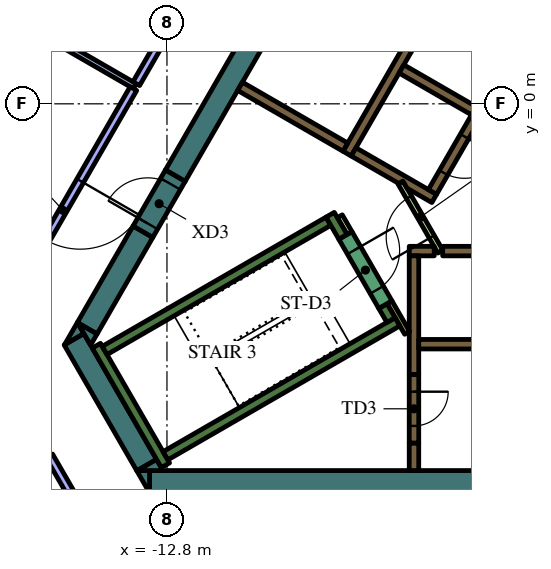
"""IFC4 building model, lengths in metres.
Left out: names, types, materials, properties, quantities, classifications, styles, units other than length and angle.
Written with IfcOpenShell. Run it as: python <this file> out.ifc"""

import sys

from ifc_helpers import new_model, si_unit, direction, frame, frame_2d, origin, place, context, subcontext, project, spatial, polyline, rectangle, outline, extrude, element, fill, save


model = new_model("IFC4")
c1 = context("Model", 3, precision=1e-05, world=origin(), true_north=direction((0.0, 1.0)))
c2 = subcontext(c1, "Body", "Model", "MODEL_VIEW")
j1 = project(units=[si_unit("LENGTHUNIT", "METRE"), si_unit("PLANEANGLEUNIT", "RADIAN")], contexts=[c1])
p1 = place(None, origin())
s1 = spatial("IfcSite", under=j1, at=p1, CompositionType="ELEMENT")
p2 = place(p1, origin())
s2 = spatial("IfcBuilding", under=s1, at=p2, CompositionType="ELEMENT")
p3 = place(p2, frame((0.0, 0.0, 317.4)))
s3 = spatial("IfcBuildingStorey", under=s2, at=p3, CompositionType="ELEMENT", Elevation=317.4)
p4 = place(p3, frame((8.904, -9.95, 0.0), z_axis=(0.0, 0.0, 1.0), x_axis=(-1.0, 0.0, 0.0)))
e1 = element("IfcWall", 1, at=p4, inside=s3, PredefinedType="SOLIDWALL", context=c2, shape_type="SweptSolid", body=[
    extrude(rectangle(XDim=22.161, YDim=0.6, at=frame_2d((11.081, 0.0))), origin(), (0.0, 0.0, 1.0), 4.2),
])
p5 = place(p3, origin())
e2 = element("IfcWall", 2, at=p5, inside=s3, PredefinedType="SOLIDWALL", context=c2, shape_type="SweptSolid", body=[
    extrude(outline(polyline([(-13.597, -9.65), (-13.259, -9.65), (-13.259, -10.236), (-13.597, -9.65)])), origin(), (0.0, 0.0, 1.0), 4.2),
])
p6 = place(p3, frame((-13.333, -9.506, 0.0), z_axis=(0.0, 0.0, 1.0), x_axis=(-0.500019073792, 0.866014391245, 0.0)))
e3 = element("IfcWall", 3, at=p6, inside=s3, PredefinedType="SOLIDWALL", context=c2, shape_type="SweptSolid", body=[
    extrude(rectangle(XDim=3.823, YDim=0.6, at=frame_2d((1.912, 0.0))), origin(), (0.0, 0.0, 1.0), 4.2),
])
e4 = element("IfcWall", 4, at=p5, inside=s3, PredefinedType="SOLIDWALL", context=c2, shape_type="SweptSolid", body=[
    extrude(outline(polyline([(-14.987, -6.043), (-15.493, -6.335), (-15.156, -5.75), (-14.987, -6.043)])), origin(), (0.0, 0.0, 1.0), 4.2),
])
e5 = element("IfcWall", 5, at=p5, inside=s3, PredefinedType="SOLIDWALL", context=c2, shape_type="SweptSolid", body=[
    extrude(outline(polyline([(-12.904, -9.65), (-13.58, -9.65), (-13.073, -9.357), (-12.904, -9.65)])), origin(), (0.0, 0.0, 1.0), 4.2),
])
p7 = place(p3, frame((-13.432, -3.364, 0.0), z_axis=(0.0, 0.0, 1.0), x_axis=(-0.499960127962, -0.866048422692, 0.0)))
e6 = element("IfcWall", 6, at=p7, inside=s3, PredefinedType="SOLIDWALL", context=c2, shape_type="SweptSolid", body=[
    extrude(rectangle(XDim=2.934, YDim=0.6, at=frame_2d((1.467, 0.0))), origin(), (0.0, 0.0, 1.0), 4.2),
])
e7 = element("IfcWall", 7, at=p5, inside=s3, PredefinedType="SOLIDWALL", context=c2, shape_type="SweptSolid", body=[
    extrude(outline(polyline([(-14.809, -6.35), (-15.147, -5.764), (-14.64, -6.057), (-14.809, -6.35)])), origin(), (0.0, 0.0, 1.0), 4.2),
])
p8 = place(p3, frame((-12.582, -1.892, 0.0), z_axis=(0.0, 0.0, 1.0), x_axis=(0.500003640647, 0.866023301845, 0.0)))
e8 = element("IfcWall", 8, at=p8, inside=s3, PredefinedType="SOLIDWALL", context=c2, shape_type="SweptSolid", body=[
    extrude(rectangle(XDim=15.858, YDim=0.6, at=frame_2d((7.929, 0.0))), origin(), (0.0, 0.0, 1.0), 4.2),
])
p9 = place(p3, frame((-12.84, -9.511, 0.0), z_axis=(0.0, 0.0, 1.0), x_axis=(-0.499997733992, 0.866026712061, 0.0)))
e9 = element("IfcWall", 9, at=p9, inside=s3, PredefinedType="SOLIDWALL", context=c2, shape_type="SweptSolid", body=[
    extrude(rectangle(XDim=3.634, YDim=0.25, at=frame_2d((1.817, 0.0))), origin(), (0.0, 0.0, 1.0), 4.2),
])
p10 = place(p3, frame((-14.44, -6.49, 0.0), z_axis=(0.0, 0.0, 1.0), x_axis=(0.866022966069, 0.500004222222, 0.0)))
e10 = element("IfcWall", 10, at=p10, inside=s3, PredefinedType="SOLIDWALL", context=c2, shape_type="SweptSolid", body=[
    extrude(rectangle(XDim=6.8, YDim=0.25, at=frame_2d((3.4, 0.0))), origin(), (0.0, 0.0, 1.0), 4.2),
])
p11 = place(p3, frame((-8.168, -3.503, 0.0), z_axis=(0.0, 0.0, 1.0), x_axis=(-0.499952099219, 0.866053057547, 0.0)))
e11 = element("IfcWall", 11, at=p11, inside=s3, PredefinedType="SOLIDWALL", context=c2, shape_type="SweptSolid", body=[
    extrude(rectangle(XDim=0.675, YDim=0.25, at=frame_2d((0.337, 0.0))), origin(), (0.0, 0.0, 1.0), 4.2),
])
p12 = place(p3, frame((-12.84, -9.261, 0.0), z_axis=(0.0, 0.0, 1.0), x_axis=(0.866016039709, 0.500016218704, 0.0)))
e12 = element("IfcWall", 12, at=p12, inside=s3, PredefinedType="SOLIDWALL", context=c2, shape_type="SweptSolid", body=[
    extrude(rectangle(XDim=7.05, YDim=0.25, at=frame_2d((3.525, 0.0))), origin(), (0.0, 0.0, 1.0), 4.2),
])
p13 = place(p3, frame((-6.905, -5.69, 0.0), z_axis=(0.0, 0.0, 1.0), x_axis=(-0.500402024738, 0.865793170242, 0.0)))
e13 = element("IfcWall", 13, at=p13, inside=s3, PredefinedType="SOLIDWALL", context=c2, shape_type="SweptSolid", body=[
    extrude(rectangle(XDim=0.425, YDim=0.25, at=frame_2d((0.212, 0.0))), origin(), (0.0, 0.0, 1.0), 4.2),
])
p14 = place(p3, frame((-5.545, -3.875, 0.0), z_axis=(0.0, 0.0, 1.0), x_axis=(1.0, 0.0, 0.0)))
e14 = element("IfcWall", 14, at=p14, inside=s3, PredefinedType="SOLIDWALL", context=c2, shape_type="SweptSolid", body=[
    extrude(rectangle(XDim=11.97, YDim=0.25, at=frame_2d((5.985, 0.0))), origin(), (0.0, 0.0, 1.0), 4.2),
])
p15 = place(p3, frame((-6.425, -3.875, 0.0), z_axis=(0.0, 0.0, 1.0), x_axis=(1.0, 0.0, 0.0)))
e15 = element("IfcWall", 15, at=p15, inside=s3, PredefinedType="SOLIDWALL", context=c2, shape_type="SweptSolid", body=[
    extrude(rectangle(XDim=0.658, YDim=0.25, at=frame_2d((0.329, 0.0))), origin(), (0.0, 0.0, 1.0), 4.2),
])
p16 = place(p3, frame((-6.3, -7.125, 0.0), z_axis=(0.0, 0.0, 1.0), x_axis=(0.0, 1.0, 0.0)))
e16 = element("IfcWall", 16, at=p16, inside=s3, PredefinedType="SOLIDWALL", context=c2, shape_type="SweptSolid", body=[
    extrude(rectangle(XDim=3.125, YDim=0.25, at=frame_2d((1.562, 0.0))), origin(), (0.0, 0.0, 1.0), 4.2),
])
p17 = place(p3, frame((-6.3, -8.925, 0.0), z_axis=(0.0, 0.0, 1.0), x_axis=(0.0, -1.0, 0.0)))
e17 = element("IfcWall", 17, at=p17, inside=s3, PredefinedType="SOLIDWALL", context=c2, shape_type="SweptSolid", body=[
    extrude(rectangle(XDim=0.725, YDim=0.25, at=frame_2d((0.363, 0.0))), origin(), (0.0, 0.0, 1.0), 4.2),
])
p18 = place(p3, frame((-8.06, -1.311, 0.0), z_axis=(0.0, 0.0, 1.0), x_axis=(0.50000273126, 0.866023826885, 0.0)))
e18 = element("IfcWall", 18, at=p18, inside=s3, PredefinedType="SOLIDWALL", context=c2, shape_type="SweptSolid", body=[
    extrude(rectangle(XDim=10.33, YDim=0.25, at=frame_2d((5.165, 0.0))), origin(), (0.0, 0.0, 1.0), 4.2),
])
p19 = place(p3, frame((-4.724, -0.182, 0.0), z_axis=(0.0, 0.0, 1.0), x_axis=(-0.866008176907, 0.50002983664, 0.0)))
e19 = element("IfcWall", 19, at=p19, inside=s3, PredefinedType="SOLIDWALL", context=c2, shape_type="SweptSolid", body=[
    extrude(rectangle(XDim=2.2, YDim=0.25, at=frame_2d((1.1, 0.0))), origin(), (0.0, 0.0, 1.0), 4.2),
])
e20 = element("IfcWall", 20, at=p5, inside=s3, PredefinedType="SOLIDWALL", context=c2, shape_type="SweptSolid", body=[
    extrude(outline(polyline([(-5.922, -2.257), (-5.922, -2.257), (-5.705, -2.382), (-5.83, -2.598), (-6.483, -2.221), (-6.591, -2.033), (-6.591, -2.033), (-6.7, -2.096), (-7.952, -1.373), (-7.827, -1.156), (-5.922, -2.257)])), origin(), (0.0, 0.0, 1.0), 4.2),
])
p20 = place(p3, frame((-8.106, -1.14, 0.0), z_axis=(0.0, 0.0, 1.0), x_axis=(-0.866008981251, 0.500028443584, 0.0)))
e21 = element("IfcWall", 21, at=p20, inside=s3, PredefinedType="SOLIDWALL", context=c2, shape_type="SweptSolid", body=[
    extrude(rectangle(XDim=3.2, YDim=0.25, at=frame_2d((1.6, 0.0))), origin(), (0.0, 0.0, 1.0), 4.2),
])
p21 = place(p3, frame((-8.252, -2.958, 0.0), z_axis=(0.0, 0.0, 1.0), x_axis=(0.500174715838, -0.865924508047, 0.0)))
e22 = element("IfcWall", 22, at=p21, inside=s3, PredefinedType="PARTITIONING", context=c2, shape_type="SweptSolid", body=[
    extrude(rectangle(XDim=0.514, YDim=0.15, at=frame_2d((0.257, 0.0))), origin(), (0.0, 0.0, 1.0), 3.5),
])
p22 = place(p3, frame((-6.48, -6.027, 0.0), z_axis=(0.0, 0.0, 1.0), x_axis=(-0.499927229454, 0.866067413802, 0.0)))
e23 = element("IfcWall", 23, at=p22, inside=s3, PredefinedType="PARTITIONING", context=c2, shape_type="SweptSolid", body=[
    extrude(rectangle(XDim=0.929, YDim=0.15, at=frame_2d((0.464, 0.0))), origin(), (0.0, 0.0, 1.0), 4.2),
])
p23 = place(p3, frame((-6.175, -6.325, 0.0), z_axis=(0.0, 0.0, 1.0), x_axis=(1.0, 0.0, 0.0)))
e24 = element("IfcWall", 24, at=p23, inside=s3, PredefinedType="SOLIDWALL", context=c2, shape_type="SweptSolid", body=[
    extrude(rectangle(XDim=12.35, YDim=0.25, at=frame_2d((6.175, 0.0))), origin(), (0.0, 0.0, 1.0), 4.2),
])
p24 = place(p23, frame((3.205, 0.0, 0.0)))
e25 = element("IfcOpeningElement", 25, at=p24, cuts=e24, PredefinedType="OPENING", context=c2, shape_type="SweptSolid", body=[
    extrude(rectangle(XDim=0.9, YDim=2.1, at=frame_2d((0.45, 1.05))), frame((0.0, 0.135, 0.0), z_axis=(0.0, -1.0, 0.0), x_axis=(1.0, 0.0, 0.0)), (0.0, 0.0, 1.0), 0.27),
])
p25 = place(p23, frame((8.145, 0.0, 0.0)))
e26 = element("IfcOpeningElement", 26, at=p25, cuts=e24, PredefinedType="OPENING", context=c2, shape_type="SweptSolid", body=[
    extrude(rectangle(XDim=1.1, YDim=2.1, at=frame_2d((0.55, 1.05))), frame((0.0, 0.135, 0.0), z_axis=(0.0, -1.0, 0.0), x_axis=(1.0, 0.0, 0.0)), (0.0, 0.0, 1.0), 0.27),
])
p26 = place(p23, frame((10.665, 0.0, 0.0)))
e27 = element("IfcOpeningElement", 27, at=p26, cuts=e24, PredefinedType="OPENING", context=c2, shape_type="SweptSolid", body=[
    extrude(rectangle(XDim=1.1, YDim=2.1, at=frame_2d((0.55, 1.05))), frame((0.0, 0.135, 0.0), z_axis=(0.0, -1.0, 0.0), x_axis=(1.0, 0.0, 0.0)), (0.0, 0.0, 1.0), 0.27),
])
p27 = place(p3, frame((-0.898, 6.194, 0.0), z_axis=(0.0, 0.0, 1.0), x_axis=(-0.499996202215, -0.866027596426, 0.0)))
e28 = element("IfcWall", 28, at=p27, inside=s3, PredefinedType="SOLIDWALL", context=c2, shape_type="SweptSolid", body=[
    extrude(rectangle(XDim=9.83, YDim=0.25, at=frame_2d((4.915, 0.0))), origin(), (0.0, 0.0, 1.0), 4.2),
])
p28 = place(p27, frame((0.585, 0.0, 0.0)))
e29 = element("IfcOpeningElement", 29, at=p28, cuts=e28, PredefinedType="OPENING", context=c2, shape_type="SweptSolid", body=[
    extrude(rectangle(XDim=1.1, YDim=2.1, at=frame_2d((0.55, 1.05))), frame((0.0, 0.135, 0.0), z_axis=(0.0, -1.0, 0.0), x_axis=(1.0, 0.0, 0.0)), (0.0, 0.0, 1.0), 0.27),
])
p29 = place(p27, frame((3.105, 0.0, 0.0)))
e30 = element("IfcOpeningElement", 30, at=p29, cuts=e28, PredefinedType="OPENING", context=c2, shape_type="SweptSolid", body=[
    extrude(rectangle(XDim=1.1, YDim=2.1, at=frame_2d((0.55, 1.05))), frame((0.0, 0.135, 0.0), z_axis=(0.0, -1.0, 0.0), x_axis=(1.0, 0.0, 0.0)), (0.0, 0.0, 1.0), 0.27),
])
p30 = place(p27, frame((5.625, 0.0, 0.0)))
e31 = element("IfcOpeningElement", 31, at=p30, cuts=e28, PredefinedType="OPENING", context=c2, shape_type="SweptSolid", body=[
    extrude(rectangle(XDim=1.1, YDim=2.1, at=frame_2d((0.55, 1.05))), frame((0.0, 0.135, 0.0), z_axis=(0.0, -1.0, 0.0), x_axis=(1.0, 0.0, 0.0)), (0.0, 0.0, 1.0), 0.27),
])
p31 = place(p27, frame((8.145, 0.0, 0.0)))
e32 = element("IfcOpeningElement", 32, at=p31, cuts=e28, PredefinedType="OPENING", context=c2, shape_type="SweptSolid", body=[
    extrude(rectangle(XDim=1.1, YDim=2.1, at=frame_2d((0.55, 1.05))), frame((0.0, 0.135, 0.0), z_axis=(0.0, -1.0, 0.0), x_axis=(1.0, 0.0, 0.0)), (0.0, 0.0, 1.0), 0.27),
])
p32 = place(p3, frame((-8.103, -3.466, 0.0), z_axis=(0.0, 0.0, 1.0), x_axis=(0.500078061341, -0.865980330357, 0.0)))
e33 = element("IfcWall", 33, at=p32, inside=s3, PredefinedType="SOLIDWALL", context=c2, shape_type="SweptSolid", body=[
    extrude(rectangle(XDim=2.1, YDim=0.4, at=frame_2d((1.05, 0.0))), origin(), (0.0, 0.0, 1.0), 4.2),
])
p33 = place(p32, frame((0.45, 0.0, 0.0)))
e34 = element("IfcOpeningElement", 34, at=p33, cuts=e33, PredefinedType="OPENING", context=c2, shape_type="SweptSolid", body=[
    extrude(rectangle(XDim=1.2, YDim=2.1, at=frame_2d((0.6, 1.05))), frame((0.0, 0.21, 0.0), z_axis=(0.0, -1.0, 0.0), x_axis=(1.0, 0.0, 0.0)), (0.0, 0.0, 1.0), 0.42),
])
p34 = place(p3, frame((-6.3, -7.125, 0.0), z_axis=(0.0, 0.0, 1.0), x_axis=(0.0, -1.0, 0.0)))
e35 = element("IfcWall", 35, at=p34, inside=s3, PredefinedType="SOLIDWALL", context=c2, shape_type="SweptSolid", body=[
    extrude(rectangle(XDim=1.8, YDim=0.25, at=frame_2d((0.9, 0.0))), origin(), (0.0, 0.0, 1.0), 4.2),
])
p35 = place(p34, frame((0.45, 0.0, 0.0)))
e36 = element("IfcOpeningElement", 36, at=p35, cuts=e35, PredefinedType="OPENING", context=c2, shape_type="SweptSolid", body=[
    extrude(rectangle(XDim=0.9, YDim=2.1, at=frame_2d((0.45, 1.05))), frame((0.0, 0.135, 0.0), z_axis=(0.0, -1.0, 0.0), x_axis=(1.0, 0.0, 0.0)), (0.0, 0.0, 1.0), 0.27),
])
p36 = place(p3, frame((-5.606, -3.89, 0.0), z_axis=(0.0, 0.0, 1.0), x_axis=(-0.500027713859, 0.866009402589, 0.0)))
e37 = element("IfcWall", 37, at=p36, inside=s3, PredefinedType="PARTITIONING", context=c2, shape_type="SweptSolid", body=[
    extrude(rectangle(XDim=2.1, YDim=0.15, at=frame_2d((1.05, 0.0))), origin(), (0.0, 0.0, 1.0), 3.5),
])
p37 = place(p36, frame((0.45, 0.0, 0.0)))
e38 = element("IfcOpeningElement", 38, at=p37, cuts=e37, PredefinedType="OPENING", context=c2, shape_type="SweptSolid", body=[
    extrude(rectangle(XDim=1.2, YDim=2.1, at=frame_2d((0.6, 1.05))), frame((0.0, 0.085, 0.0), z_axis=(0.0, -1.0, 0.0), x_axis=(1.0, 0.0, 0.0)), (0.0, 0.0, 1.0), 0.17),
])
p38 = place(p3, frame((-13.432, -3.364, 0.0), z_axis=(0.0, 0.0, 1.0), x_axis=(0.500062241894, 0.865989465428, 0.0)))
e39 = element("IfcWall", 39, at=p38, inside=s3, PredefinedType="SOLIDWALL", context=c2, shape_type="SweptSolid", body=[
    extrude(rectangle(XDim=1.7, YDim=0.6, at=frame_2d((0.85, 0.0))), origin(), (0.0, 0.0, 1.0), 4.2),
])
p39 = place(p38, frame((0.25, 0.0, 0.0)))
e40 = element("IfcOpeningElement", 40, at=p39, cuts=e39, PredefinedType="OPENING", context=c2, shape_type="SweptSolid", body=[
    extrude(rectangle(XDim=1.2, YDim=2.1, at=frame_2d((0.6, 1.05))), frame((0.0, 0.31, 0.0), z_axis=(0.0, -1.0, 0.0), x_axis=(1.0, 0.0, 0.0)), (0.0, 0.0, 1.0), 0.62),
])
p40 = place(p3, frame((-13.646, 0.465, 0.0), z_axis=(0.0, 0.0, 1.0), x_axis=(-0.866033427365, 0.499986102494, 0.0)))
e41 = element("IfcWall", 41, at=p40, inside=s3, PredefinedType="PARTITIONING", context=c2, shape_type="SweptSolid", body=[
    extrude(rectangle(XDim=6.573, YDim=0.15, at=frame_2d((3.287, 0.0))), origin(), (0.0, 0.0, 1.0), 3.5),
])
p41 = place(p3, frame((-12.951, 1.669, 0.0), z_axis=(0.0, 0.0, 1.0), x_axis=(-0.49987242464, -0.866099046925, 0.0)))
e42 = element("IfcWall", 42, at=p41, inside=s3, PredefinedType="PARTITIONING", context=c2, shape_type="SweptSolid", body=[
    extrude(rectangle(XDim=1.315, YDim=0.2, at=frame_2d((0.658, 0.0))), origin(), (0.0, 0.0, 1.0), 3.5),
])
p42 = place(p3, frame((-13.683, 0.4, 0.0), z_axis=(0.0, 0.0, 1.0), x_axis=(-0.500004109969, -0.86602303088, 0.0)))
e43 = element("IfcWall", 43, at=p42, inside=s3, PredefinedType="PARTITIONING", context=c2, shape_type="SweptSolid", body=[
    extrude(rectangle(XDim=7.303, YDim=0.2, at=frame_2d((3.652, 0.0))), origin(), (0.0, 0.0, 1.0), 3.5),
])
p43 = place(p42, frame((2.8, 0.0, 0.0)))
e44 = element("IfcOpeningElement", 44, at=p43, cuts=e43, PredefinedType="OPENING", context=c2, shape_type="SweptSolid", body=[
    extrude(rectangle(XDim=1.8, YDim=2.1, at=frame_2d((0.9, 1.05))), frame((0.0, 0.11, 0.0), z_axis=(0.0, -1.0, 0.0), x_axis=(1.0, 0.0, 0.0)), (0.0, 0.0, 1.0), 0.22),
])
p44 = place(p3, frame((-15.897, -9.265, 0.0), z_axis=(0.0, 0.0, 1.0), x_axis=(0.500033484244, -0.866006070784, 0.0)))
e45 = element("IfcWall", 45, at=p44, inside=s3, PredefinedType="PARTITIONING", context=c2, shape_type="SweptSolid", body=[
    extrude(rectangle(XDim=3.216, YDim=0.2, at=frame_2d((1.608, 0.0))), origin(), (0.0, 0.0, 1.0), 3.5),
])
p45 = place(p31, origin())
e46 = element("IfcDoor", 46, at=p45, inside=s3, OperationType="DOUBLE_DOOR_SLIDING", PredefinedType="DOOR", context=c2, shape_type="SweptSolid", body=[
    extrude(rectangle(XDim=1.1, YDim=2.1, at=frame_2d((0.55, 1.05))), frame((0.0, 0.025, 0.0), z_axis=(0.0, -1.0, 0.0), x_axis=(1.0, 0.0, 0.0)), (0.0, 0.0, 1.0), 0.05),
])
fill(e32, e46)
p46 = place(p33, origin())
e47 = element("IfcDoor", 47, at=p46, inside=s3, OperationType="SINGLE_SWING_LEFT", PredefinedType="DOOR", context=c2, shape_type="SweptSolid", body=[
    extrude(rectangle(XDim=1.2, YDim=2.1, at=frame_2d((0.6, 1.05))), frame((0.0, 0.025, 0.0), z_axis=(0.0, -1.0, 0.0), x_axis=(1.0, 0.0, 0.0)), (0.0, 0.0, 1.0), 0.05),
])
fill(e34, e47)
p47 = place(p35, origin())
e48 = element("IfcDoor", 48, at=p47, inside=s3, OperationType="SINGLE_SWING_LEFT", PredefinedType="DOOR", context=c2, shape_type="SweptSolid", body=[
    extrude(rectangle(XDim=0.9, YDim=2.1, at=frame_2d((0.45, 1.05))), frame((0.0, 0.025, 0.0), z_axis=(0.0, -1.0, 0.0), x_axis=(1.0, 0.0, 0.0)), (0.0, 0.0, 1.0), 0.05),
])
fill(e36, e48)
p48 = place(p37, origin())
e49 = element("IfcDoor", 49, at=p48, inside=s3, OperationType="SINGLE_SWING_LEFT", PredefinedType="DOOR", context=c2, shape_type="SweptSolid", body=[
    extrude(rectangle(XDim=1.2, YDim=2.1, at=frame_2d((0.6, 1.05))), frame((0.0, 0.025, 0.0), z_axis=(0.0, -1.0, 0.0), x_axis=(1.0, 0.0, 0.0)), (0.0, 0.0, 1.0), 0.05),
])
fill(e38, e49)
p49 = place(p39, origin())
e50 = element("IfcDoor", 50, at=p49, inside=s3, OperationType="SINGLE_SWING_LEFT", PredefinedType="DOOR", context=c2, shape_type="SweptSolid", body=[
    extrude(rectangle(XDim=1.2, YDim=2.1, at=frame_2d((0.6, 1.05))), frame((0.0, 0.025, 0.0), z_axis=(0.0, -1.0, 0.0), x_axis=(1.0, 0.0, 0.0)), (0.0, 0.0, 1.0), 0.05),
])
fill(e40, e50)
p50 = place(p43, origin())
e51 = element("IfcDoor", 51, at=p50, inside=s3, OperationType="DOUBLE_DOOR_SINGLE_SWING", PredefinedType="DOOR", context=c2, shape_type="SweptSolid", body=[
    extrude(rectangle(XDim=1.8, YDim=2.1, at=frame_2d((0.9, 1.05))), frame((0.0, 0.025, 0.0), z_axis=(0.0, -1.0, 0.0), x_axis=(1.0, 0.0, 0.0)), (0.0, 0.0, 1.0), 0.05),
])
fill(e44, e51)
save(model, sys.argv[1])
